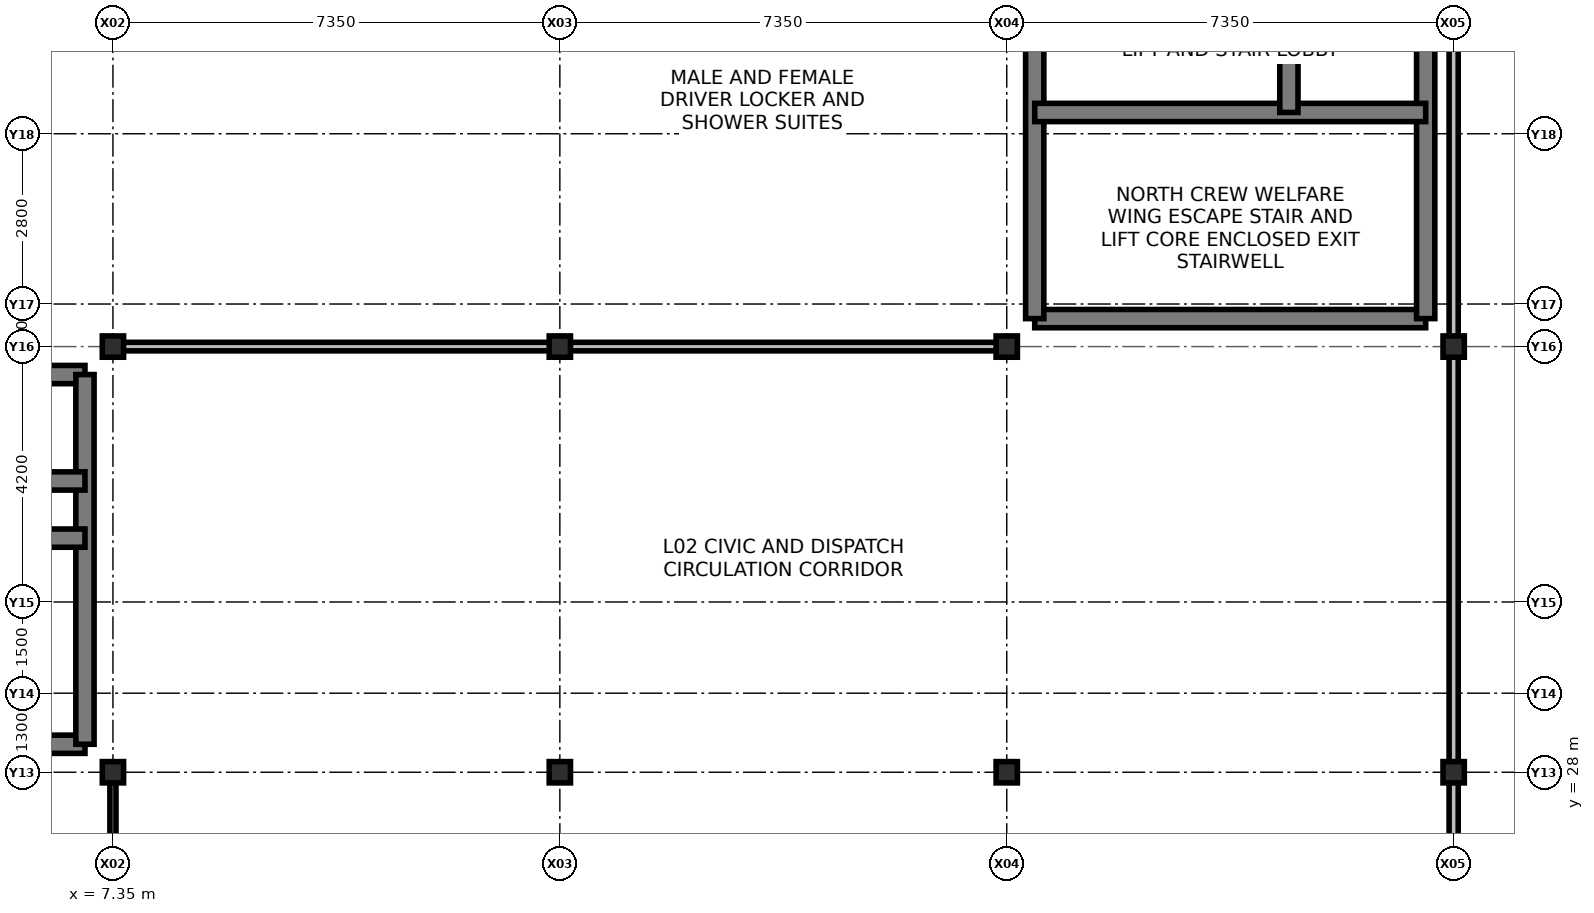
"""IFC4 building model, lengths in metres.
Left out: names, types, materials, properties, quantities, classifications, styles, units other than length and angle.
Written with IfcOpenShell. Run it as: python <this file> out.ifc"""

import sys

from ifc_helpers import new_model, si_unit, direction, frame, frame_2d, origin, origin_2d, place, context, subcontext, project, spatial, rectangle, i_section, extrude, element, fill, save


model = new_model("IFC4")
c1 = context("Model", 3, precision=1e-05, world=origin(), true_north=direction((0.0, 1.0)))
c2 = subcontext(c1, "Body", "Model", "MODEL_VIEW")
j1 = project(units=[si_unit("LENGTHUNIT", "METRE"), si_unit("PLANEANGLEUNIT", "RADIAN")], contexts=[c1])
p1 = place(None, origin())
s1 = spatial("IfcSite", under=j1, at=p1, CompositionType="ELEMENT")
p2 = place(p1, origin())
s2 = spatial("IfcBuilding", under=s1, at=p2, CompositionType="ELEMENT")
p3 = place(p2, frame((0.0, 0.0, 6.0)))
s3 = spatial("IfcBuildingStorey", under=s2, at=p3, CompositionType="ELEMENT", Elevation=6.0)
for number, where, z_axis, x_axis in (
    (1, (7.35, 28.0, 0.0), (0.0, 0.0, 1.0), (1.0, 0.0, 0.0)),
    (2, (7.35, 35.0, 0.0), (0.0, 0.0, 1.0), (1.0, 0.0, 0.0)),
    (3, (14.7, 28.0, 0.0), (0.0, 0.0, 1.0), (1.0, 0.0, 0.0)),
    (4, (14.7, 35.0, 0.0), (0.0, 0.0, 1.0), (1.0, 0.0, 0.0)),
    (5, (22.05, 28.0, 0.0), (0.0, 0.0, 1.0), (1.0, 0.0, 0.0)),
    (6, (22.05, 35.0, 0.0), (0.0, 0.0, 1.0), (1.0, 0.0, 0.0)),
    (7, (29.4, 28.0, 0.0), (0.0, 0.0, 1.0), (1.0, 0.0, 0.0)),
    (8, (29.4, 35.0, 0.0), (0.0, 0.0, 1.0), (1.0, 0.0, 0.0)),
):
    element("IfcColumn", number, at=place(p3, frame(where, z_axis=z_axis, x_axis=x_axis)), inside=s3, PredefinedType="COLUMN", context=c2, shape_type="SweptSolid", body=[
        extrude(i_section(OverallWidth=0.35, OverallDepth=0.35, WebThickness=0.012, FlangeThickness=0.019, at=origin_2d()), origin(), (0.0, 0.0, 1.0), 5.1),
    ])
p4 = place(p3, frame((0.46, 28.46, 0.0), z_axis=(0.0, 0.0, 1.0), x_axis=(1.0, 0.0, 0.0)))
e9 = element("IfcWall", 9, at=p4, inside=s3, PredefinedType="SHEAR", context=c2, shape_type="SweptSolid", body=[
    extrude(rectangle(XDim=6.43, YDim=0.3, at=frame_2d((3.215, 0.0))), origin(), (0.0, 0.0, 1.0), 4.82),
])
p5 = place(p3, frame((0.46, 34.54, 0.0), z_axis=(0.0, 0.0, 1.0), x_axis=(1.0, 0.0, 0.0)))
e10 = element("IfcWall", 10, at=p5, inside=s3, PredefinedType="SHEAR", context=c2, shape_type="SweptSolid", body=[
    extrude(rectangle(XDim=6.43, YDim=0.3, at=frame_2d((3.215, 0.0))), origin(), (0.0, 0.0, 1.0), 4.82),
])
p6 = place(p5, frame((0.55, 0.0, 0.0)))
e11 = element("IfcOpeningElement", 11, at=p6, cuts=e10, PredefinedType="OPENING", context=c2, shape_type="SweptSolid", body=[
    extrude(rectangle(XDim=1.5, YDim=2.2, at=frame_2d((0.75, 1.1))), frame((0.0, 0.16, 0.0), z_axis=(0.0, -1.0, 0.0), x_axis=(1.0, 0.0, 0.0)), (0.0, 0.0, 1.0), 0.32),
])
p7 = place(p3, frame((6.89, 28.46, 0.0), z_axis=(0.0, 0.0, 1.0), x_axis=(0.0, 1.0, 0.0)))
e12 = element("IfcWall", 12, at=p7, inside=s3, PredefinedType="SHEAR", context=c2, shape_type="SweptSolid", body=[
    extrude(rectangle(XDim=6.08, YDim=0.3, at=frame_2d((3.04, 0.0))), origin(), (0.0, 0.0, 1.0), 4.82),
])
p8 = place(p3, frame((0.46, 31.85, 0.0), z_axis=(0.0, 0.0, 1.0), x_axis=(1.0, 0.0, 0.0)))
e13 = element("IfcWall", 13, at=p8, inside=s3, PredefinedType="SHEAR", context=c2, shape_type="SweptSolid", body=[
    extrude(rectangle(XDim=6.43, YDim=0.3, at=frame_2d((3.215, 0.0))), origin(), (0.0, 0.0, 1.0), 4.82),
])
p9 = place(p8, frame((0.185, 0.0, 0.0)))
e14 = element("IfcOpeningElement", 14, at=p9, cuts=e13, PredefinedType="OPENING", context=c2, shape_type="SweptSolid", body=[
    extrude(rectangle(XDim=1.05, YDim=2.15, at=frame_2d((0.525, 1.075))), frame((0.0, 0.16, 0.0), z_axis=(0.0, -1.0, 0.0), x_axis=(1.0, 0.0, 0.0)), (0.0, 0.0, 1.0), 0.32),
])
p10 = place(p3, frame((3.34, 32.79, 0.0), z_axis=(0.0, 0.0, 1.0), x_axis=(1.0, 0.0, 0.0)))
e15 = element("IfcWall", 15, at=p10, inside=s3, PredefinedType="SHEAR", context=c2, shape_type="SweptSolid", body=[
    extrude(rectangle(XDim=3.55, YDim=0.3, at=frame_2d((1.775, 0.0))), origin(), (0.0, 0.0, 1.0), 4.82),
])
p11 = place(p10, frame((0.25, 0.0, 0.0)))
e16 = element("IfcOpeningElement", 16, at=p11, cuts=e15, PredefinedType="OPENING", context=c2, shape_type="SweptSolid", body=[
    extrude(rectangle(XDim=1.1, YDim=2.15, at=frame_2d((0.55, 1.075))), frame((0.0, 0.16, 0.0), z_axis=(0.0, -1.0, 0.0), x_axis=(1.0, 0.0, 0.0)), (0.0, 0.0, 1.0), 0.32),
])
p12 = place(p10, frame((1.75, 0.0, 0.0)))
e17 = element("IfcOpeningElement", 17, at=p12, cuts=e15, PredefinedType="OPENING", context=c2, shape_type="SweptSolid", body=[
    extrude(rectangle(XDim=1.2, YDim=2.2, at=frame_2d((0.6, 1.1))), frame((0.0, 0.16, 0.0), z_axis=(0.0, -1.0, 0.0), x_axis=(1.0, 0.0, 0.0)), (0.0, 0.0, 1.0), 0.32),
])
p13 = place(p3, frame((22.51, 35.46, 0.0), z_axis=(0.0, 0.0, 1.0), x_axis=(1.0, 0.0, 0.0)))
e18 = element("IfcWall", 18, at=p13, inside=s3, PredefinedType="SHEAR", context=c2, shape_type="SweptSolid", body=[
    extrude(rectangle(XDim=6.43, YDim=0.3, at=frame_2d((3.215, 0.0))), origin(), (0.0, 0.0, 1.0), 4.82),
])
for number, where, z_axis, x_axis in (
    (19, (22.51, 35.46, 0.0), (0.0, 0.0, 1.0), (0.0, 1.0, 0.0)),
    (20, (28.94, 35.46, 0.0), (0.0, 0.0, 1.0), (0.0, 1.0, 0.0)),
):
    element("IfcWall", number, at=place(p3, frame(where, z_axis=z_axis, x_axis=x_axis)), inside=s3, PredefinedType="SHEAR", context=c2, shape_type="SweptSolid", body=[
        extrude(rectangle(XDim=6.08, YDim=0.3, at=frame_2d((3.04, 0.0))), origin(), (0.0, 0.0, 1.0), 4.82),
    ])
p14 = place(p3, frame((22.51, 38.85, 0.0), z_axis=(0.0, 0.0, 1.0), x_axis=(1.0, 0.0, 0.0)))
e21 = element("IfcWall", 21, at=p14, inside=s3, PredefinedType="SHEAR", context=c2, shape_type="SweptSolid", body=[
    extrude(rectangle(XDim=6.43, YDim=0.3, at=frame_2d((3.215, 0.0))), origin(), (0.0, 0.0, 1.0), 4.82),
])
p15 = place(p14, frame((0.185, 0.0, 0.0)))
e22 = element("IfcOpeningElement", 22, at=p15, cuts=e21, PredefinedType="OPENING", context=c2, shape_type="SweptSolid", body=[
    extrude(rectangle(XDim=1.05, YDim=2.15, at=frame_2d((0.525, 1.075))), frame((0.0, 0.16, 0.0), z_axis=(0.0, -1.0, 0.0), x_axis=(1.0, 0.0, 0.0)), (0.0, 0.0, 1.0), 0.32),
])
p16 = place(p3, frame((26.69, 38.85, 0.0), z_axis=(0.0, 0.0, 1.0), x_axis=(0.0, 1.0, 0.0)))
e23 = element("IfcWall", 23, at=p16, inside=s3, PredefinedType="SHEAR", context=c2, shape_type="SweptSolid", body=[
    extrude(rectangle(XDim=2.69, YDim=0.3, at=frame_2d((1.345, 0.0))), origin(), (0.0, 0.0, 1.0), 4.82),
])
p17 = place(p16, frame((0.4, 0.0, 0.0)))
e24 = element("IfcOpeningElement", 24, at=p17, cuts=e23, PredefinedType="OPENING", context=c2, shape_type="SweptSolid", body=[
    extrude(rectangle(XDim=1.1, YDim=2.15, at=frame_2d((0.55, 1.075))), frame((0.0, 0.16, 0.0), z_axis=(0.0, -1.0, 0.0), x_axis=(1.0, 0.0, 0.0)), (0.0, 0.0, 1.0), 0.32),
])
p18 = place(p3, frame((29.4, 14.0, 0.0), z_axis=(0.0, 0.0, 1.0), x_axis=(0.0, 1.0, 0.0)))
e25 = element("IfcWall", 25, at=p18, inside=s3, PredefinedType="PARTITIONING", context=c2, shape_type="SweptSolid", body=[
    extrude(rectangle(XDim=49.0, YDim=0.15, at=frame_2d((24.5, 0.0))), origin(), (0.0, 0.0, 1.0), 4.05),
])
p19 = place(p18, frame((10.0, 0.0, 0.0)))
e26 = element("IfcOpeningElement", 26, at=p19, cuts=e25, PredefinedType="OPENING", context=c2, shape_type="SweptSolid", body=[
    extrude(rectangle(XDim=1.4, YDim=2.2, at=frame_2d((0.7, 1.1))), frame((0.0, 0.085, 0.0), z_axis=(0.0, -1.0, 0.0), x_axis=(1.0, 0.0, 0.0)), (0.0, 0.0, 1.0), 0.17),
])
p20 = place(p18, frame((31.0, 0.0, 0.0)))
e27 = element("IfcOpeningElement", 27, at=p20, cuts=e25, PredefinedType="OPENING", context=c2, shape_type="SweptSolid", body=[
    extrude(rectangle(XDim=1.25, YDim=2.15, at=frame_2d((0.625, 1.075))), frame((0.0, 0.085, 0.0), z_axis=(0.0, -1.0, 0.0), x_axis=(1.0, 0.0, 0.0)), (0.0, 0.0, 1.0), 0.17),
])
p21 = place(p3, frame((7.35, 35.0, 0.0), z_axis=(0.0, 0.0, 1.0), x_axis=(1.0, 0.0, 0.0)))
e28 = element("IfcWall", 28, at=p21, inside=s3, PredefinedType="PARTITIONING", context=c2, shape_type="SweptSolid", body=[
    extrude(rectangle(XDim=14.7, YDim=0.14, at=frame_2d((7.35, 0.0))), origin(), (0.0, 0.0, 1.0), 4.05),
])
p22 = place(p21, frame((3.5, 0.0, 0.0)))
e29 = element("IfcOpeningElement", 29, at=p22, cuts=e28, PredefinedType="OPENING", context=c2, shape_type="SweptSolid", body=[
    extrude(rectangle(XDim=1.05, YDim=2.1, at=frame_2d((0.525, 1.05))), frame((0.0, 0.08, 0.0), z_axis=(0.0, -1.0, 0.0), x_axis=(1.0, 0.0, 0.0)), (0.0, 0.0, 1.0), 0.16),
])
p23 = place(p21, frame((10.0, 0.0, 0.0)))
e30 = element("IfcOpeningElement", 30, at=p23, cuts=e28, PredefinedType="OPENING", context=c2, shape_type="SweptSolid", body=[
    extrude(rectangle(XDim=1.2, YDim=2.1, at=frame_2d((0.6, 1.05))), frame((0.0, 0.08, 0.0), z_axis=(0.0, -1.0, 0.0), x_axis=(1.0, 0.0, 0.0)), (0.0, 0.0, 1.0), 0.16),
])
p24 = place(p3, frame((7.35, 7.0, 0.0), z_axis=(0.0, 0.0, 1.0), x_axis=(0.0, 1.0, 0.0)))
e31 = element("IfcWall", 31, at=p24, inside=s3, PredefinedType="PARTITIONING", context=c2, shape_type="SweptSolid", body=[
    extrude(rectangle(XDim=21.0, YDim=0.1, at=frame_2d((10.5, 0.0))), origin(), (0.0, 0.0, 1.0), 4.05),
])
p25 = place(p24, frame((3.2, 0.0, 0.0)))
e32 = element("IfcOpeningElement", 32, at=p25, cuts=e31, PredefinedType="OPENING", context=c2, shape_type="SweptSolid", body=[
    extrude(rectangle(XDim=1.1, YDim=2.1, at=frame_2d((0.55, 1.05))), frame((0.0, 0.06, 0.0), z_axis=(0.0, -1.0, 0.0), x_axis=(1.0, 0.0, 0.0)), (0.0, 0.0, 1.0), 0.12),
])
p26 = place(p15, origin())
e33 = element("IfcDoor", 33, at=p26, inside=s3, OperationType="SINGLE_SWING_RIGHT", PredefinedType="DOOR", context=c2, shape_type="SweptSolid", body=[
    extrude(rectangle(XDim=1.05, YDim=2.15, at=frame_2d((0.525, 1.075))), frame((0.0, 0.025, 0.0), z_axis=(0.0, -1.0, 0.0), x_axis=(1.0, 0.0, 0.0)), (0.0, 0.0, 1.0), 0.05),
])
fill(e22, e33)
p27 = place(p17, origin())
e34 = element("IfcDoor", 34, at=p27, inside=s3, OperationType="SLIDING_TO_RIGHT", PredefinedType="DOOR", context=c2, shape_type="SweptSolid", body=[
    extrude(rectangle(XDim=1.1, YDim=2.15, at=frame_2d((0.55, 1.075))), frame((0.0, 0.025, 0.0), z_axis=(0.0, -1.0, 0.0), x_axis=(1.0, 0.0, 0.0)), (0.0, 0.0, 1.0), 0.05),
])
fill(e24, e34)
p28 = place(p22, origin())
e35 = element("IfcDoor", 35, at=p28, inside=s3, OperationType="SINGLE_SWING_RIGHT", PredefinedType="DOOR", context=c2, shape_type="SweptSolid", body=[
    extrude(rectangle(XDim=1.05, YDim=2.1, at=frame_2d((0.525, 1.05))), frame((0.0, 0.025, 0.0), z_axis=(0.0, -1.0, 0.0), x_axis=(1.0, 0.0, 0.0)), (0.0, 0.0, 1.0), 0.05),
])
fill(e29, e35)
p29 = place(p23, origin())
e36 = element("IfcDoor", 36, at=p29, inside=s3, OperationType="SINGLE_SWING_LEFT", PredefinedType="DOOR", context=c2, shape_type="SweptSolid", body=[
    extrude(rectangle(XDim=1.2, YDim=2.1, at=frame_2d((0.6, 1.05))), frame((0.0, 0.025, 0.0), z_axis=(0.0, -1.0, 0.0), x_axis=(1.0, 0.0, 0.0)), (0.0, 0.0, 1.0), 0.05),
])
fill(e30, e36)
save(model, sys.argv[1])
